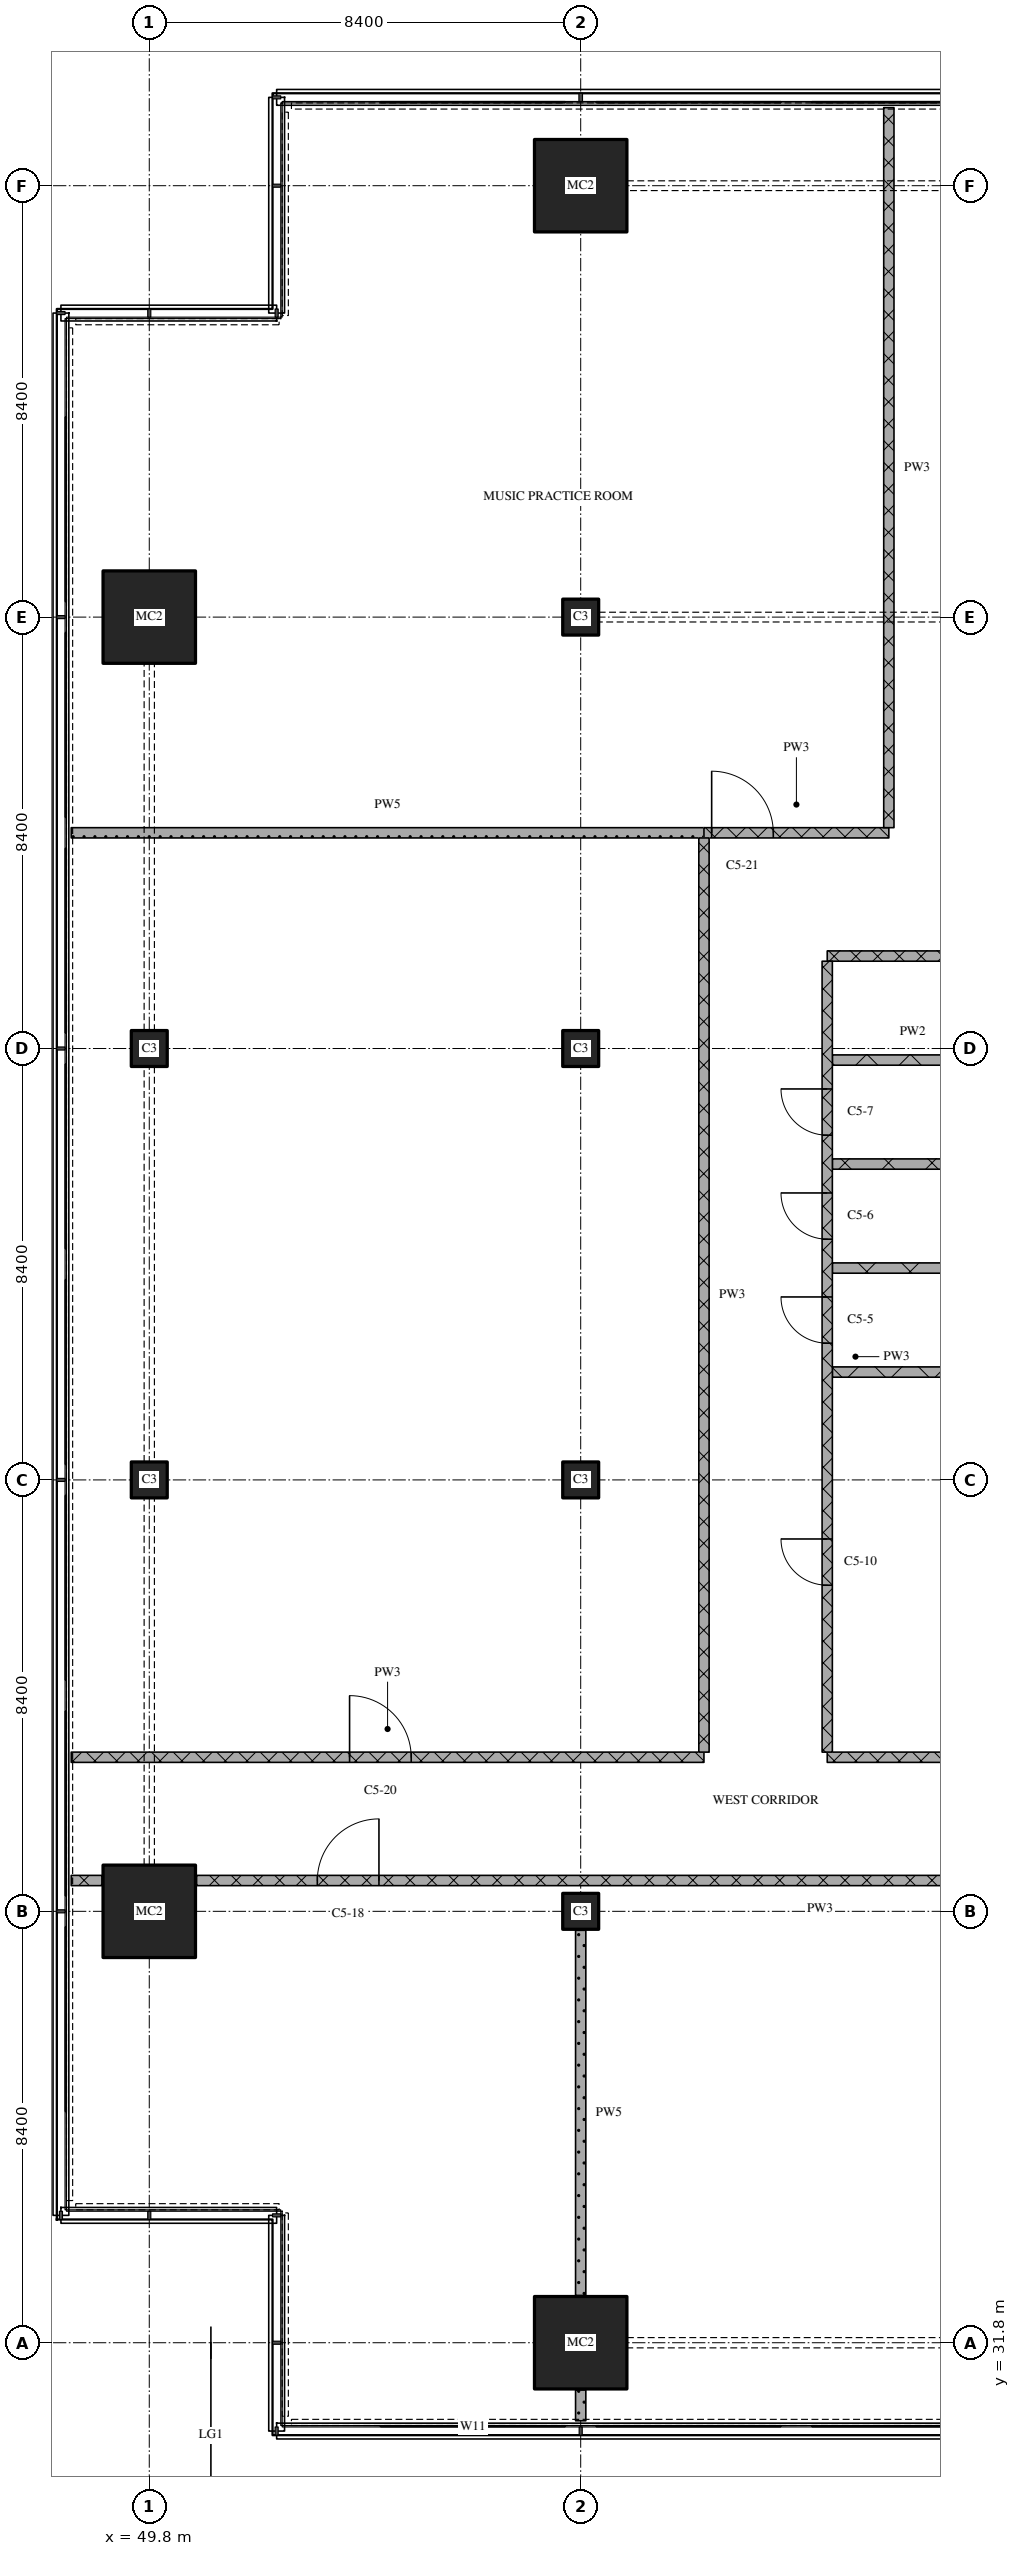
"""IFC4 building model, lengths in metres.
Left out: names, types, materials, properties, quantities, classifications, styles, units other than length and angle.
Written with IfcOpenShell. Run it as: python <this file> out.ifc"""

import sys

from ifc_helpers import new_model, si_unit, direction, frame, frame_2d, origin, origin_2d, place, context, subcontext, project, spatial, rectangle, extrude, element, fill, save


model = new_model("IFC4")
c1 = context("Model", 3, precision=1e-05, world=origin(), true_north=direction((0.0, 1.0)))
c2 = subcontext(c1, "Body", "Model", "MODEL_VIEW")
j1 = project(units=[si_unit("LENGTHUNIT", "METRE"), si_unit("PLANEANGLEUNIT", "RADIAN")], contexts=[c1])
p1 = place(None, origin())
s1 = spatial("IfcSite", under=j1, at=p1, CompositionType="ELEMENT")
p2 = place(p1, origin())
s2 = spatial("IfcBuilding", under=s1, at=p2, CompositionType="ELEMENT")
p3 = place(p2, frame((0.0, 0.0, 190.65)))
s3 = spatial("IfcBuildingStorey", under=s2, at=p3, CompositionType="ELEMENT", Elevation=190.65)
p4 = place(p3, frame((49.8, 40.2, 0.0), z_axis=(0.0, 0.0, 1.0), x_axis=(1.0, 0.0, 0.0)))
e1 = element("IfcColumn", 1, at=p4, inside=s3, PredefinedType="COLUMN", context=c2, shape_type="SweptSolid", body=[
    extrude(rectangle(XDim=1.8, YDim=1.8, at=origin_2d()), origin(), (0.0, 0.0, 1.0), 3.6),
])
for number, where, z_axis, x_axis in (
    (2, (49.8, 48.6, 0.0), (0.0, 0.0, 1.0), (1.0, 0.0, 0.0)),
    (3, (49.8, 57.0, 0.0), (0.0, 0.0, 1.0), (1.0, 0.0, 0.0)),
):
    element("IfcColumn", number, at=place(p3, frame(where, z_axis=z_axis, x_axis=x_axis)), inside=s3, PredefinedType="COLUMN", context=c2, shape_type="SweptSolid", body=[
        extrude(rectangle(XDim=0.7, YDim=0.7, at=origin_2d()), origin(), (0.0, 0.0, 1.0), 3.6),
    ])
for number, where, z_axis, x_axis in (
    (4, (49.8, 65.4, 0.0), (0.0, 0.0, 1.0), (1.0, 0.0, 0.0)),
    (5, (58.2, 31.8, 0.0), (0.0, 0.0, 1.0), (1.0, 0.0, 0.0)),
):
    element("IfcColumn", number, at=place(p3, frame(where, z_axis=z_axis, x_axis=x_axis)), inside=s3, PredefinedType="COLUMN", context=c2, shape_type="SweptSolid", body=[
        extrude(rectangle(XDim=1.8, YDim=1.8, at=origin_2d()), origin(), (0.0, 0.0, 1.0), 3.6),
    ])
for number, where, z_axis, x_axis in (
    (6, (58.2, 40.2, 0.0), (0.0, 0.0, 1.0), (1.0, 0.0, 0.0)),
    (7, (58.2, 48.6, 0.0), (0.0, 0.0, 1.0), (1.0, 0.0, 0.0)),
    (8, (58.2, 57.0, 0.0), (0.0, 0.0, 1.0), (1.0, 0.0, 0.0)),
    (9, (58.2, 65.4, 0.0), (0.0, 0.0, 1.0), (1.0, 0.0, 0.0)),
):
    element("IfcColumn", number, at=place(p3, frame(where, z_axis=z_axis, x_axis=x_axis)), inside=s3, PredefinedType="COLUMN", context=c2, shape_type="SweptSolid", body=[
        extrude(rectangle(XDim=0.7, YDim=0.7, at=origin_2d()), origin(), (0.0, 0.0, 1.0), 3.6),
    ])
p5 = place(p3, frame((58.2, 73.8, 0.0), z_axis=(0.0, 0.0, 1.0), x_axis=(1.0, 0.0, 0.0)))
e10 = element("IfcColumn", 10, at=p5, inside=s3, PredefinedType="COLUMN", context=c2, shape_type="SweptSolid", body=[
    extrude(rectangle(XDim=1.8, YDim=1.8, at=origin_2d()), origin(), (0.0, 0.0, 1.0), 3.6),
])
p6 = place(p3, frame((48.28, 40.8, 0.0), z_axis=(0.0, 0.0, 1.0), x_axis=(1.0, 0.0, 0.0)))
e11 = element("IfcWall", 11, at=p6, inside=s3, PredefinedType="PARTITIONING", context=c2, shape_type="SweptSolid", body=[
    extrude(rectangle(XDim=0.6, YDim=0.2, at=frame_2d((0.3, 0.0))), origin(), (0.0, 0.0, 1.0), 3.3),
])
p7 = place(p3, frame((75.0, 40.8, 0.0), z_axis=(0.0, 0.0, 1.0), x_axis=(-1.0, 0.0, 0.0)))
e12 = element("IfcWall", 12, at=p7, inside=s3, PredefinedType="PARTITIONING", context=c2, shape_type="SweptSolid", body=[
    extrude(rectangle(XDim=24.28, YDim=0.2, at=frame_2d((12.14, 0.0))), origin(), (0.0, 0.0, 1.0), 3.3),
])
p8 = place(p7, frame((6.75, 0.0, 0.0)))
e13 = element("IfcOpeningElement", 13, at=p8, cuts=e12, PredefinedType="OPENING", context=c2, shape_type="SweptSolid", body=[
    extrude(rectangle(XDim=1.2, YDim=2.1, at=frame_2d((0.6, 1.05))), frame((0.0, 0.11, 0.0), z_axis=(0.0, -1.0, 0.0), x_axis=(1.0, 0.0, 0.0)), (0.0, 0.0, 1.0), 0.22),
])
p9 = place(p7, frame((20.728, 0.0, 0.0)))
e14 = element("IfcOpeningElement", 14, at=p9, cuts=e12, PredefinedType="OPENING", context=c2, shape_type="SweptSolid", body=[
    extrude(rectangle(XDim=1.2, YDim=2.1, at=frame_2d((0.6, 1.05))), frame((0.0, 0.11, 0.0), z_axis=(0.0, -1.0, 0.0), x_axis=(1.0, 0.0, 0.0)), (0.0, 0.0, 1.0), 0.22),
])
p10 = place(p3, frame((48.28, 43.2, 0.0), z_axis=(0.0, 0.0, 1.0), x_axis=(1.0, 0.0, 0.0)))
e15 = element("IfcWall", 15, at=p10, inside=s3, PredefinedType="PARTITIONING", context=c2, shape_type="SweptSolid", body=[
    extrude(rectangle(XDim=12.32, YDim=0.2, at=frame_2d((6.16, 0.0))), origin(), (0.0, 0.0, 1.0), 3.3),
])
p11 = place(p10, frame((5.42, 0.0, 0.0)))
e16 = element("IfcOpeningElement", 16, at=p11, cuts=e15, PredefinedType="OPENING", context=c2, shape_type="SweptSolid", body=[
    extrude(rectangle(XDim=1.2, YDim=2.1, at=frame_2d((0.6, 1.05))), frame((0.0, 0.11, 0.0), z_axis=(0.0, -1.0, 0.0), x_axis=(1.0, 0.0, 0.0)), (0.0, 0.0, 1.0), 0.22),
])
p12 = place(p3, frame((63.0, 43.2, 0.0), z_axis=(0.0, 0.0, 1.0), x_axis=(1.0, 0.0, 0.0)))
e17 = element("IfcWall", 17, at=p12, inside=s3, PredefinedType="PARTITIONING", context=c2, shape_type="SweptSolid", body=[
    extrude(rectangle(XDim=5.2, YDim=0.2, at=frame_2d((2.6, 0.0))), origin(), (0.0, 0.0, 1.0), 3.3),
])
p13 = place(p3, frame((63.1, 50.7, 0.0), z_axis=(0.0, 0.0, 1.0), x_axis=(1.0, 0.0, 0.0)))
e18 = element("IfcWall", 18, at=p13, inside=s3, PredefinedType="PARTITIONING", context=c2, shape_type="SweptSolid", body=[
    extrude(rectangle(XDim=5.1, YDim=0.2, at=frame_2d((2.55, 0.0))), origin(), (0.0, 0.0, 1.0), 3.3),
])
for number, where, z_axis, x_axis in (
    (19, (63.1, 52.725, 0.0), (0.0, 0.0, 1.0), (1.0, 0.0, 0.0)),
    (20, (63.1, 54.75, 0.0), (0.0, 0.0, 1.0), (1.0, 0.0, 0.0)),
):
    element("IfcWall", number, at=place(p3, frame(where, z_axis=z_axis, x_axis=x_axis)), inside=s3, PredefinedType="PARTITIONING", context=c2, shape_type="SweptSolid", body=[
        extrude(rectangle(XDim=10.6, YDim=0.2, at=frame_2d((5.3, 0.0))), origin(), (0.0, 0.0, 1.0), 3.3),
    ])
p14 = place(p3, frame((63.1, 56.775, 0.0), z_axis=(0.0, 0.0, 1.0), x_axis=(1.0, 0.0, 0.0)))
e21 = element("IfcWall", 21, at=p14, inside=s3, PredefinedType="PARTITIONING", context=c2, shape_type="SweptSolid", body=[
    extrude(rectangle(XDim=3.13, YDim=0.2, at=frame_2d((1.565, 0.0))), origin(), (0.0, 0.0, 1.0), 3.3),
])
p15 = place(p3, frame((73.8, 58.8, 0.0), z_axis=(0.0, 0.0, 1.0), x_axis=(-1.0, 0.0, 0.0)))
e22 = element("IfcWall", 22, at=p15, inside=s3, PredefinedType="PARTITIONING", context=c2, shape_type="SweptSolid", body=[
    extrude(rectangle(XDim=10.8, YDim=0.2, at=frame_2d((5.4, 0.0))), origin(), (0.0, 0.0, 1.0), 3.3),
])
p16 = place(p15, frame((4.95, 0.0, 0.0)))
e23 = element("IfcOpeningElement", 23, at=p16, cuts=e22, PredefinedType="OPENING", context=c2, shape_type="SweptSolid", body=[
    extrude(rectangle(XDim=0.9, YDim=2.1, at=frame_2d((0.45, 1.05))), frame((0.0, 0.11, 0.0), z_axis=(0.0, -1.0, 0.0), x_axis=(1.0, 0.0, 0.0)), (0.0, 0.0, 1.0), 0.22),
])
p17 = place(p3, frame((60.6, 61.2, 0.0), z_axis=(0.0, 0.0, 1.0), x_axis=(1.0, 0.0, 0.0)))
e24 = element("IfcWall", 24, at=p17, inside=s3, PredefinedType="PARTITIONING", context=c2, shape_type="SweptSolid", body=[
    extrude(rectangle(XDim=3.6, YDim=0.2, at=frame_2d((1.8, 0.0))), origin(), (0.0, 0.0, 1.0), 3.3),
])
p18 = place(p17, frame((0.15, 0.0, 0.0)))
e25 = element("IfcOpeningElement", 25, at=p18, cuts=e24, PredefinedType="OPENING", context=c2, shape_type="SweptSolid", body=[
    extrude(rectangle(XDim=1.2, YDim=2.1, at=frame_2d((0.6, 1.05))), frame((0.0, 0.11, 0.0), z_axis=(0.0, -1.0, 0.0), x_axis=(1.0, 0.0, 0.0)), (0.0, 0.0, 1.0), 0.22),
])
p19 = place(p3, frame((48.28, 61.2, 0.0), z_axis=(0.0, 0.0, 1.0), x_axis=(1.0, 0.0, 0.0)))
e26 = element("IfcWall", 26, at=p19, inside=s3, PredefinedType="PARTITIONING", context=c2, shape_type="SweptSolid", body=[
    extrude(rectangle(XDim=12.32, YDim=0.2, at=frame_2d((6.16, 0.0))), origin(), (0.0, 0.0, 1.0), 3.3),
])
p20 = place(p3, frame((58.2, 30.88, 0.0), z_axis=(0.0, 0.0, 1.0), x_axis=(0.0, -1.0, 0.0)))
e27 = element("IfcWall", 27, at=p20, inside=s3, PredefinedType="PARTITIONING", context=c2, shape_type="SweptSolid", body=[
    extrude(rectangle(XDim=0.6, YDim=0.2, at=frame_2d((0.3, 0.0))), origin(), (0.0, 0.0, 1.0), 3.3),
])
p21 = place(p3, frame((58.2, 39.83, 0.0), z_axis=(0.0, 0.0, 1.0), x_axis=(0.0, -1.0, 0.0)))
e28 = element("IfcWall", 28, at=p21, inside=s3, PredefinedType="PARTITIONING", context=c2, shape_type="SweptSolid", body=[
    extrude(rectangle(XDim=7.11, YDim=0.2, at=frame_2d((3.555, 0.0))), origin(), (0.0, 0.0, 1.0), 3.3),
])
p22 = place(p3, frame((60.6, 61.1, 0.0), z_axis=(0.0, 0.0, 1.0), x_axis=(0.0, -1.0, 0.0)))
e29 = element("IfcWall", 29, at=p22, inside=s3, PredefinedType="PARTITIONING", context=c2, shape_type="SweptSolid", body=[
    extrude(rectangle(XDim=17.8, YDim=0.2, at=frame_2d((8.9, 0.0))), origin(), (0.0, 0.0, 1.0), 3.3),
])
p23 = place(p3, frame((63.0, 58.7, 0.0), z_axis=(0.0, 0.0, 1.0), x_axis=(0.0, -1.0, 0.0)))
e30 = element("IfcWall", 30, at=p23, inside=s3, PredefinedType="PARTITIONING", context=c2, shape_type="SweptSolid", body=[
    extrude(rectangle(XDim=15.4, YDim=0.2, at=frame_2d((7.7, 0.0))), origin(), (0.0, 0.0, 1.0), 3.3),
])
p24 = place(p23, frame((2.488, 0.0, 0.0)))
e31 = element("IfcOpeningElement", 31, at=p24, cuts=e30, PredefinedType="OPENING", context=c2, shape_type="SweptSolid", body=[
    extrude(rectangle(XDim=0.9, YDim=2.1, at=frame_2d((0.45, 1.05))), frame((0.0, 0.11, 0.0), z_axis=(0.0, -1.0, 0.0), x_axis=(1.0, 0.0, 0.0)), (0.0, 0.0, 1.0), 0.22),
])
p25 = place(p23, frame((4.512, 0.0, 0.0)))
e32 = element("IfcOpeningElement", 32, at=p25, cuts=e30, PredefinedType="OPENING", context=c2, shape_type="SweptSolid", body=[
    extrude(rectangle(XDim=0.9, YDim=2.1, at=frame_2d((0.45, 1.05))), frame((0.0, 0.11, 0.0), z_axis=(0.0, -1.0, 0.0), x_axis=(1.0, 0.0, 0.0)), (0.0, 0.0, 1.0), 0.22),
])
p26 = place(p23, frame((6.538, 0.0, 0.0)))
e33 = element("IfcOpeningElement", 33, at=p26, cuts=e30, PredefinedType="OPENING", context=c2, shape_type="SweptSolid", body=[
    extrude(rectangle(XDim=0.9, YDim=2.1, at=frame_2d((0.45, 1.05))), frame((0.0, 0.11, 0.0), z_axis=(0.0, -1.0, 0.0), x_axis=(1.0, 0.0, 0.0)), (0.0, 0.0, 1.0), 0.22),
])
p27 = place(p23, frame((11.25, 0.0, 0.0)))
e34 = element("IfcOpeningElement", 34, at=p27, cuts=e30, PredefinedType="OPENING", context=c2, shape_type="SweptSolid", body=[
    extrude(rectangle(XDim=0.9, YDim=2.1, at=frame_2d((0.45, 1.05))), frame((0.0, 0.11, 0.0), z_axis=(0.0, -1.0, 0.0), x_axis=(1.0, 0.0, 0.0)), (0.0, 0.0, 1.0), 0.22),
])
p28 = place(p3, frame((64.2, 75.32, 0.0), z_axis=(0.0, 0.0, 1.0), x_axis=(0.0, -1.0, 0.0)))
e35 = element("IfcWall", 35, at=p28, inside=s3, PredefinedType="PARTITIONING", context=c2, shape_type="SweptSolid", body=[
    extrude(rectangle(XDim=14.02, YDim=0.2, at=frame_2d((7.01, 0.0))), origin(), (0.0, 0.0, 1.0), 3.3),
])
p29 = place(p9, origin())
e36 = element("IfcDoor", 36, at=p29, inside=s3, OperationType="SINGLE_SWING_RIGHT", PredefinedType="DOOR", context=c2, shape_type="SweptSolid", body=[
    extrude(rectangle(XDim=1.2, YDim=2.1, at=frame_2d((0.6, 1.05))), frame((0.0, 0.025, 0.0), z_axis=(0.0, -1.0, 0.0), x_axis=(1.0, 0.0, 0.0)), (0.0, 0.0, 1.0), 0.05),
])
fill(e14, e36)
p30 = place(p11, origin())
e37 = element("IfcDoor", 37, at=p30, inside=s3, OperationType="SINGLE_SWING_LEFT", PredefinedType="DOOR", context=c2, shape_type="SweptSolid", body=[
    extrude(rectangle(XDim=1.2, YDim=2.1, at=frame_2d((0.6, 1.05))), frame((0.0, 0.025, 0.0), z_axis=(0.0, -1.0, 0.0), x_axis=(1.0, 0.0, 0.0)), (0.0, 0.0, 1.0), 0.05),
])
fill(e16, e37)
p31 = place(p18, origin())
e38 = element("IfcDoor", 38, at=p31, inside=s3, OperationType="SINGLE_SWING_LEFT", PredefinedType="DOOR", context=c2, shape_type="SweptSolid", body=[
    extrude(rectangle(XDim=1.2, YDim=2.1, at=frame_2d((0.6, 1.05))), frame((0.0, 0.025, 0.0), z_axis=(0.0, -1.0, 0.0), x_axis=(1.0, 0.0, 0.0)), (0.0, 0.0, 1.0), 0.05),
])
fill(e25, e38)
p32 = place(p24, origin())
e39 = element("IfcDoor", 39, at=p32, inside=s3, OperationType="SINGLE_SWING_RIGHT", PredefinedType="DOOR", context=c2, shape_type="SweptSolid", body=[
    extrude(rectangle(XDim=0.9, YDim=2.1, at=frame_2d((0.45, 1.05))), frame((0.0, 0.025, 0.0), z_axis=(0.0, -1.0, 0.0), x_axis=(1.0, 0.0, 0.0)), (0.0, 0.0, 1.0), 0.05),
])
fill(e31, e39)
p33 = place(p25, origin())
e40 = element("IfcDoor", 40, at=p33, inside=s3, OperationType="SINGLE_SWING_RIGHT", PredefinedType="DOOR", context=c2, shape_type="SweptSolid", body=[
    extrude(rectangle(XDim=0.9, YDim=2.1, at=frame_2d((0.45, 1.05))), frame((0.0, 0.025, 0.0), z_axis=(0.0, -1.0, 0.0), x_axis=(1.0, 0.0, 0.0)), (0.0, 0.0, 1.0), 0.05),
])
fill(e32, e40)
p34 = place(p26, origin())
e41 = element("IfcDoor", 41, at=p34, inside=s3, OperationType="SINGLE_SWING_RIGHT", PredefinedType="DOOR", context=c2, shape_type="SweptSolid", body=[
    extrude(rectangle(XDim=0.9, YDim=2.1, at=frame_2d((0.45, 1.05))), frame((0.0, 0.025, 0.0), z_axis=(0.0, -1.0, 0.0), x_axis=(1.0, 0.0, 0.0)), (0.0, 0.0, 1.0), 0.05),
])
fill(e33, e41)
p35 = place(p27, origin())
e42 = element("IfcDoor", 42, at=p35, inside=s3, OperationType="SINGLE_SWING_RIGHT", PredefinedType="DOOR", context=c2, shape_type="SweptSolid", body=[
    extrude(rectangle(XDim=0.9, YDim=2.1, at=frame_2d((0.45, 1.05))), frame((0.0, 0.025, 0.0), z_axis=(0.0, -1.0, 0.0), x_axis=(1.0, 0.0, 0.0)), (0.0, 0.0, 1.0), 0.05),
])
fill(e34, e42)
save(model, sys.argv[1])
